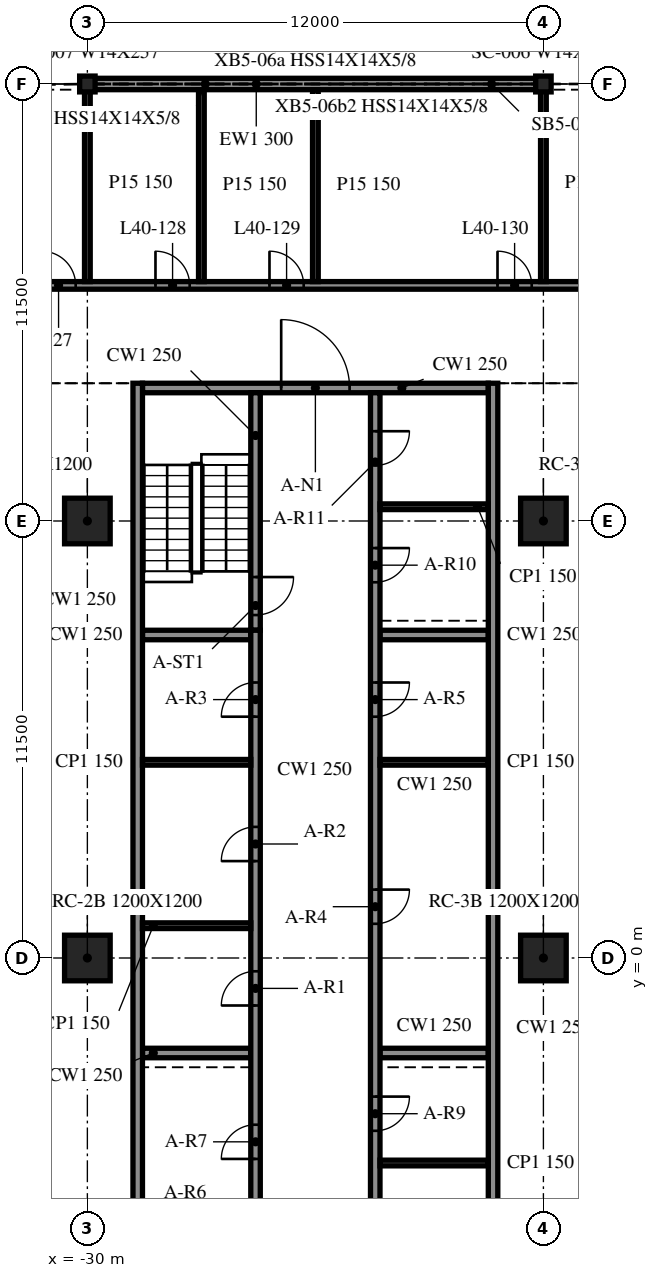
"""IFC4 building model, lengths in metres.
Left out: names, types, materials, properties, quantities, classifications, styles, units other than length and angle.
Written with IfcOpenShell. Run it as: python <this file> out.ifc"""

import sys

from ifc_helpers import new_model, si_unit, direction, frame, frame_2d, origin, origin_2d, place, context, subcontext, project, spatial, rectangle, i_section, extrude, element, fill, save


model = new_model("IFC4")
c1 = context("Model", 3, precision=1e-05, world=origin(), true_north=direction((0.0, 1.0)))
c2 = subcontext(c1, "Body", "Model", "MODEL_VIEW")
j1 = project(units=[si_unit("LENGTHUNIT", "METRE"), si_unit("PLANEANGLEUNIT", "RADIAN")], contexts=[c1])
p1 = place(None, origin())
s1 = spatial("IfcSite", under=j1, at=p1, CompositionType="ELEMENT")
p2 = place(p1, origin())
s2 = spatial("IfcBuilding", under=s1, at=p2, CompositionType="ELEMENT")
p3 = place(p2, frame((0.0, 0.0, 170.6)))
s3 = spatial("IfcBuildingStorey", under=s2, at=p3, CompositionType="ELEMENT", Elevation=170.6)
for number, where, z_axis, x_axis in (
    (1, (-30.0, 0.0, -0.34), (0.0, 0.0, 1.0), (1.0, 0.0, 0.0)),
    (2, (-30.0, 11.5, -0.34), (0.0, 0.0, 1.0), (1.0, 0.0, 0.0)),
    (3, (-18.0, 0.0, -0.34), (0.0, 0.0, 1.0), (1.0, 0.0, 0.0)),
    (4, (-18.0, 11.5, -0.34), (0.0, 0.0, 1.0), (1.0, 0.0, 0.0)),
):
    element("IfcColumn", number, at=place(p3, frame(where, z_axis=z_axis, x_axis=x_axis)), inside=s3, PredefinedType="COLUMN", context=c2, shape_type="SweptSolid", body=[
        extrude(rectangle(XDim=1.2, YDim=1.2, at=origin_2d()), origin(), (0.0, 0.0, 1.0), 3.8),
    ])
for number, where, z_axis, x_axis in (
    (5, (-18.0, 23.0, -0.34), (0.0, 0.0, 1.0), (1.0, 0.0, 0.0)),
    (6, (-30.0, 23.0, -0.34), (0.0, 0.0, 1.0), (1.0, 0.0, 0.0)),
):
    element("IfcColumn", number, at=place(p3, frame(where, z_axis=z_axis, x_axis=x_axis)), inside=s3, PredefinedType="COLUMN", context=c2, shape_type="SweptSolid", body=[
        extrude(i_section(OverallWidth=0.406, OverallDepth=0.417, WebThickness=0.03, FlangeThickness=0.048, at=origin_2d()), origin(), (0.0, 0.0, 1.0), 3.8),
    ])
p4 = place(p3, frame((-18.015, 23.0, 0.0), z_axis=(0.0, 0.0, 1.0), x_axis=(-1.0, 0.0, 0.0)))
e7 = element("IfcWall", 7, at=p4, inside=s3, PredefinedType="NOTDEFINED", context=c2, shape_type="SweptSolid", body=[
    extrude(rectangle(XDim=11.97, YDim=0.3, at=frame_2d((5.985, 0.0))), origin(), (0.0, 0.0, 1.0), 2.782),
])
for number, where, z_axis, x_axis in (
    (8, (-28.675, 15.125, 0.0), (0.0, 0.0, 1.0), (0.0, -1.0, 0.0)),
    (9, (-19.325, -9.125, 0.0), (0.0, 0.0, 1.0), (0.0, 1.0, 0.0)),
):
    element("IfcWall", number, at=place(p3, frame(where, z_axis=z_axis, x_axis=x_axis)), inside=s3, PredefinedType="SOLIDWALL", context=c2, shape_type="SweptSolid", body=[
        extrude(rectangle(XDim=24.25, YDim=0.25, at=frame_2d((12.125, 0.0))), origin(), (0.0, 0.0, 1.0), 3.46),
    ])
p5 = place(p3, frame((-28.55, 15.0, 0.0), z_axis=(0.0, 0.0, 1.0), x_axis=(1.0, 0.0, 0.0)))
e10 = element("IfcWall", 10, at=p5, inside=s3, PredefinedType="SOLIDWALL", context=c2, shape_type="SweptSolid", body=[
    extrude(rectangle(XDim=9.1, YDim=0.25, at=frame_2d((4.55, 0.0))), origin(), (0.0, 0.0, 1.0), 3.46),
])
p6 = place(p5, frame((3.65, 0.0, 0.0)))
e11 = element("IfcOpeningElement", 11, at=p6, cuts=e10, PredefinedType="OPENING", context=c2, shape_type="SweptSolid", body=[
    extrude(rectangle(XDim=1.8, YDim=2.1, at=frame_2d((0.9, 1.05))), frame((0.0, 0.135, 0.0), z_axis=(0.0, -1.0, 0.0), x_axis=(1.0, 0.0, 0.0)), (0.0, 0.0, 1.0), 0.27),
])
p7 = place(p3, frame((-25.575, -8.875, 0.0), z_axis=(0.0, 0.0, 1.0), x_axis=(0.0, 1.0, 0.0)))
e12 = element("IfcWall", 12, at=p7, inside=s3, PredefinedType="SOLIDWALL", context=c2, shape_type="SweptSolid", body=[
    extrude(rectangle(XDim=17.5, YDim=0.25, at=frame_2d((8.75, 0.0))), origin(), (0.0, 0.0, 1.0), 3.46),
])
p8 = place(p7, frame((7.625, 0.0, 0.0)))
e13 = element("IfcOpeningElement", 13, at=p8, cuts=e12, PredefinedType="OPENING", context=c2, shape_type="SweptSolid", body=[
    extrude(rectangle(XDim=0.9, YDim=2.1, at=frame_2d((0.45, 1.05))), frame((0.0, 0.135, 0.0), z_axis=(0.0, -1.0, 0.0), x_axis=(1.0, 0.0, 0.0)), (0.0, 0.0, 1.0), 0.27),
])
p9 = place(p7, frame((11.425, 0.0, 0.0)))
e14 = element("IfcOpeningElement", 14, at=p9, cuts=e12, PredefinedType="OPENING", context=c2, shape_type="SweptSolid", body=[
    extrude(rectangle(XDim=0.9, YDim=2.1, at=frame_2d((0.45, 1.05))), frame((0.0, 0.135, 0.0), z_axis=(0.0, -1.0, 0.0), x_axis=(1.0, 0.0, 0.0)), (0.0, 0.0, 1.0), 0.27),
])
p10 = place(p7, frame((15.225, 0.0, 0.0)))
e15 = element("IfcOpeningElement", 15, at=p10, cuts=e12, PredefinedType="OPENING", context=c2, shape_type="SweptSolid", body=[
    extrude(rectangle(XDim=0.9, YDim=2.1, at=frame_2d((0.45, 1.05))), frame((0.0, 0.135, 0.0), z_axis=(0.0, -1.0, 0.0), x_axis=(1.0, 0.0, 0.0)), (0.0, 0.0, 1.0), 0.27),
])
p11 = place(p7, frame((0.512, 0.0, 0.0)))
e16 = element("IfcOpeningElement", 16, at=p11, cuts=e12, PredefinedType="OPENING", context=c2, shape_type="SweptSolid", body=[
    extrude(rectangle(XDim=0.9, YDim=2.1, at=frame_2d((0.45, 1.05))), frame((0.0, 0.135, 0.0), z_axis=(0.0, -1.0, 0.0), x_axis=(1.0, 0.0, 0.0)), (0.0, 0.0, 1.0), 0.27),
])
p12 = place(p7, frame((3.587, 0.0, 0.0)))
e17 = element("IfcOpeningElement", 17, at=p12, cuts=e12, PredefinedType="OPENING", context=c2, shape_type="SweptSolid", body=[
    extrude(rectangle(XDim=0.9, YDim=2.1, at=frame_2d((0.45, 1.05))), frame((0.0, 0.135, 0.0), z_axis=(0.0, -1.0, 0.0), x_axis=(1.0, 0.0, 0.0)), (0.0, 0.0, 1.0), 0.27),
])
p13 = place(p3, frame((-25.575, 14.875, 0.0), z_axis=(0.0, 0.0, 1.0), x_axis=(0.0, -1.0, 0.0)))
e18 = element("IfcWall", 18, at=p13, inside=s3, PredefinedType="SOLIDWALL", context=c2, shape_type="SweptSolid", body=[
    extrude(rectangle(XDim=6.25, YDim=0.25, at=frame_2d((3.125, 0.0))), origin(), (0.0, 0.0, 1.0), 3.46),
])
p14 = place(p13, frame((4.85, 0.0, 0.0)))
e19 = element("IfcOpeningElement", 19, at=p14, cuts=e18, PredefinedType="OPENING", context=c2, shape_type="SweptSolid", body=[
    extrude(rectangle(XDim=1.0, YDim=2.1, at=frame_2d((0.5, 1.05))), frame((0.0, 0.135, 0.0), z_axis=(0.0, -1.0, 0.0), x_axis=(1.0, 0.0, 0.0)), (0.0, 0.0, 1.0), 0.27),
])
p15 = place(p3, frame((-22.425, 14.875, 0.0), z_axis=(0.0, 0.0, 1.0), x_axis=(0.0, -1.0, 0.0)))
e20 = element("IfcWall", 20, at=p15, inside=s3, PredefinedType="SOLIDWALL", context=c2, shape_type="SweptSolid", body=[
    extrude(rectangle(XDim=23.75, YDim=0.25, at=frame_2d((11.875, 0.0))), origin(), (0.0, 0.0, 1.0), 3.46),
])
p16 = place(p15, frame((13.075, 0.0, 0.0)))
e21 = element("IfcOpeningElement", 21, at=p16, cuts=e20, PredefinedType="OPENING", context=c2, shape_type="SweptSolid", body=[
    extrude(rectangle(XDim=0.9, YDim=2.1, at=frame_2d((0.45, 1.05))), frame((0.0, 0.135, 0.0), z_axis=(0.0, -1.0, 0.0), x_axis=(1.0, 0.0, 0.0)), (0.0, 0.0, 1.0), 0.27),
])
p17 = place(p15, frame((7.625, 0.0, 0.0)))
e22 = element("IfcOpeningElement", 22, at=p17, cuts=e20, PredefinedType="OPENING", context=c2, shape_type="SweptSolid", body=[
    extrude(rectangle(XDim=0.9, YDim=2.1, at=frame_2d((0.45, 1.05))), frame((0.0, 0.135, 0.0), z_axis=(0.0, -1.0, 0.0), x_axis=(1.0, 0.0, 0.0)), (0.0, 0.0, 1.0), 0.27),
])
p18 = place(p15, frame((21.597, 0.0, 0.0)))
e23 = element("IfcOpeningElement", 23, at=p18, cuts=e20, PredefinedType="OPENING", context=c2, shape_type="SweptSolid", body=[
    extrude(rectangle(XDim=0.9, YDim=2.1, at=frame_2d((0.45, 1.05))), frame((0.0, 0.135, 0.0), z_axis=(0.0, -1.0, 0.0), x_axis=(1.0, 0.0, 0.0)), (0.0, 0.0, 1.0), 0.27),
])
p19 = place(p15, frame((18.522, 0.0, 0.0)))
e24 = element("IfcOpeningElement", 24, at=p19, cuts=e20, PredefinedType="OPENING", context=c2, shape_type="SweptSolid", body=[
    extrude(rectangle(XDim=0.9, YDim=2.1, at=frame_2d((0.45, 1.05))), frame((0.0, 0.135, 0.0), z_axis=(0.0, -1.0, 0.0), x_axis=(1.0, 0.0, 0.0)), (0.0, 0.0, 1.0), 0.27),
])
p20 = place(p15, frame((4.087, 0.0, 0.0)))
e25 = element("IfcOpeningElement", 25, at=p20, cuts=e20, PredefinedType="OPENING", context=c2, shape_type="SweptSolid", body=[
    extrude(rectangle(XDim=0.9, YDim=2.1, at=frame_2d((0.45, 1.05))), frame((0.0, 0.135, 0.0), z_axis=(0.0, -1.0, 0.0), x_axis=(1.0, 0.0, 0.0)), (0.0, 0.0, 1.0), 0.27),
])
p21 = place(p15, frame((1.012, 0.0, 0.0)))
e26 = element("IfcOpeningElement", 26, at=p21, cuts=e20, PredefinedType="OPENING", context=c2, shape_type="SweptSolid", body=[
    extrude(rectangle(XDim=0.9, YDim=2.1, at=frame_2d((0.45, 1.05))), frame((0.0, 0.135, 0.0), z_axis=(0.0, -1.0, 0.0), x_axis=(1.0, 0.0, 0.0)), (0.0, 0.0, 1.0), 0.27),
])
for number, where, z_axis, x_axis in (
    (27, (-28.55, -2.5, 0.0), (0.0, 0.0, 1.0), (1.0, 0.0, 0.0)),
    (28, (-28.55, 8.5, 0.0), (0.0, 0.0, 1.0), (1.0, 0.0, 0.0)),
    (29, (-22.3, -2.5, 0.0), (0.0, 0.0, 1.0), (1.0, 0.0, 0.0)),
    (30, (-22.3, 8.5, 0.0), (0.0, 0.0, 1.0), (1.0, 0.0, 0.0)),
):
    element("IfcWall", number, at=place(p3, frame(where, z_axis=z_axis, x_axis=x_axis)), inside=s3, PredefinedType="SOLIDWALL", context=c2, shape_type="SweptSolid", body=[
        extrude(rectangle(XDim=2.85, YDim=0.25, at=frame_2d((1.425, 0.0))), origin(), (0.0, 0.0, 1.0), 3.46),
    ])
for number, where, z_axis, x_axis in (
    (31, (-28.55, 0.85, 0.0), (0.0, 0.0, 1.0), (1.0, 0.0, 0.0)),
    (32, (-28.55, 5.15, 0.0), (0.0, 0.0, 1.0), (1.0, 0.0, 0.0)),
    (33, (-22.3, 5.15, 0.0), (0.0, 0.0, 1.0), (1.0, 0.0, 0.0)),
    (34, (-22.3, -5.395, 0.0), (0.0, 0.0, 1.0), (1.0, 0.0, 0.0)),
    (35, (-22.3, 11.875, 0.0), (0.0, 0.0, 1.0), (1.0, 0.0, 0.0)),
):
    element("IfcWall", number, at=place(p3, frame(where, z_axis=z_axis, x_axis=x_axis)), inside=s3, PredefinedType="PARTITIONING", context=c2, shape_type="SweptSolid", body=[
        extrude(rectangle(XDim=2.85, YDim=0.15, at=frame_2d((1.425, 0.0))), origin(), (0.0, 0.0, 1.0), 3.46),
    ])
p22 = place(p3, frame((-47.708, 17.7, 0.0), z_axis=(0.0, 0.0, 1.0), x_axis=(1.0, 0.0, 0.0)))
e36 = element("IfcWall", 36, at=p22, inside=s3, PredefinedType="PARTITIONING", context=c2, shape_type="SweptSolid", body=[
    extrude(rectangle(XDim=95.416, YDim=0.2, at=frame_2d((47.708, 0.0))), origin(), (0.0, 0.0, 1.0), 3.46),
])
p23 = place(p22, frame((4.5, 0.0, 0.0)))
e37 = element("IfcOpeningElement", 37, at=p23, cuts=e36, PredefinedType="OPENING", context=c2, shape_type="SweptSolid", body=[
    extrude(rectangle(XDim=0.9, YDim=2.1, at=frame_2d((0.45, 1.05))), frame((0.0, 0.11, 0.0), z_axis=(0.0, -1.0, 0.0), x_axis=(1.0, 0.0, 0.0)), (0.0, 0.0, 1.0), 0.22),
])
p24 = place(p22, frame((16.5, 0.0, 0.0)))
e38 = element("IfcOpeningElement", 38, at=p24, cuts=e36, PredefinedType="OPENING", context=c2, shape_type="SweptSolid", body=[
    extrude(rectangle(XDim=0.9, YDim=2.1, at=frame_2d((0.45, 1.05))), frame((0.0, 0.11, 0.0), z_axis=(0.0, -1.0, 0.0), x_axis=(1.0, 0.0, 0.0)), (0.0, 0.0, 1.0), 0.22),
])
p25 = place(p22, frame((19.5, 0.0, 0.0)))
e39 = element("IfcOpeningElement", 39, at=p25, cuts=e36, PredefinedType="OPENING", context=c2, shape_type="SweptSolid", body=[
    extrude(rectangle(XDim=0.9, YDim=2.1, at=frame_2d((0.45, 1.05))), frame((0.0, 0.11, 0.0), z_axis=(0.0, -1.0, 0.0), x_axis=(1.0, 0.0, 0.0)), (0.0, 0.0, 1.0), 0.22),
])
p26 = place(p22, frame((22.5, 0.0, 0.0)))
e40 = element("IfcOpeningElement", 40, at=p26, cuts=e36, PredefinedType="OPENING", context=c2, shape_type="SweptSolid", body=[
    extrude(rectangle(XDim=0.9, YDim=2.1, at=frame_2d((0.45, 1.05))), frame((0.0, 0.11, 0.0), z_axis=(0.0, -1.0, 0.0), x_axis=(1.0, 0.0, 0.0)), (0.0, 0.0, 1.0), 0.22),
])
p27 = place(p22, frame((28.5, 0.0, 0.0)))
e41 = element("IfcOpeningElement", 41, at=p27, cuts=e36, PredefinedType="OPENING", context=c2, shape_type="SweptSolid", body=[
    extrude(rectangle(XDim=0.9, YDim=2.1, at=frame_2d((0.45, 1.05))), frame((0.0, 0.11, 0.0), z_axis=(0.0, -1.0, 0.0), x_axis=(1.0, 0.0, 0.0)), (0.0, 0.0, 1.0), 0.22),
])
p28 = place(p22, frame((40.5, 0.0, 0.0)))
e42 = element("IfcOpeningElement", 42, at=p28, cuts=e36, PredefinedType="OPENING", context=c2, shape_type="SweptSolid", body=[
    extrude(rectangle(XDim=0.9, YDim=2.1, at=frame_2d((0.45, 1.05))), frame((0.0, 0.11, 0.0), z_axis=(0.0, -1.0, 0.0), x_axis=(1.0, 0.0, 0.0)), (0.0, 0.0, 1.0), 0.22),
])
p29 = place(p22, frame((43.5, 0.0, 0.0)))
e43 = element("IfcOpeningElement", 43, at=p29, cuts=e36, PredefinedType="OPENING", context=c2, shape_type="SweptSolid", body=[
    extrude(rectangle(XDim=0.9, YDim=2.1, at=frame_2d((0.45, 1.05))), frame((0.0, 0.11, 0.0), z_axis=(0.0, -1.0, 0.0), x_axis=(1.0, 0.0, 0.0)), (0.0, 0.0, 1.0), 0.22),
])
p30 = place(p22, frame((46.5, 0.0, 0.0)))
e44 = element("IfcOpeningElement", 44, at=p30, cuts=e36, PredefinedType="OPENING", context=c2, shape_type="SweptSolid", body=[
    extrude(rectangle(XDim=0.9, YDim=2.1, at=frame_2d((0.45, 1.05))), frame((0.0, 0.11, 0.0), z_axis=(0.0, -1.0, 0.0), x_axis=(1.0, 0.0, 0.0)), (0.0, 0.0, 1.0), 0.22),
])
p31 = place(p22, frame((48.1, 0.0, 0.0)))
e45 = element("IfcOpeningElement", 45, at=p31, cuts=e36, PredefinedType="OPENING", context=c2, shape_type="SweptSolid", body=[
    extrude(rectangle(XDim=0.9, YDim=2.1, at=frame_2d((0.45, 1.05))), frame((0.0, 0.11, 0.0), z_axis=(0.0, -1.0, 0.0), x_axis=(1.0, 0.0, 0.0)), (0.0, 0.0, 1.0), 0.22),
])
p32 = place(p22, frame((54.1, 0.0, 0.0)))
e46 = element("IfcOpeningElement", 46, at=p32, cuts=e36, PredefinedType="OPENING", context=c2, shape_type="SweptSolid", body=[
    extrude(rectangle(XDim=0.9, YDim=2.1, at=frame_2d((0.45, 1.05))), frame((0.0, 0.11, 0.0), z_axis=(0.0, -1.0, 0.0), x_axis=(1.0, 0.0, 0.0)), (0.0, 0.0, 1.0), 0.22),
])
p33 = place(p22, frame((66.1, 0.0, 0.0)))
e47 = element("IfcOpeningElement", 47, at=p33, cuts=e36, PredefinedType="OPENING", context=c2, shape_type="SweptSolid", body=[
    extrude(rectangle(XDim=0.9, YDim=2.1, at=frame_2d((0.45, 1.05))), frame((0.0, 0.11, 0.0), z_axis=(0.0, -1.0, 0.0), x_axis=(1.0, 0.0, 0.0)), (0.0, 0.0, 1.0), 0.22),
])
p34 = place(p22, frame((69.1, 0.0, 0.0)))
e48 = element("IfcOpeningElement", 48, at=p34, cuts=e36, PredefinedType="OPENING", context=c2, shape_type="SweptSolid", body=[
    extrude(rectangle(XDim=0.9, YDim=2.1, at=frame_2d((0.45, 1.05))), frame((0.0, 0.11, 0.0), z_axis=(0.0, -1.0, 0.0), x_axis=(1.0, 0.0, 0.0)), (0.0, 0.0, 1.0), 0.22),
])
p35 = place(p22, frame((72.1, 0.0, 0.0)))
e49 = element("IfcOpeningElement", 49, at=p35, cuts=e36, PredefinedType="OPENING", context=c2, shape_type="SweptSolid", body=[
    extrude(rectangle(XDim=0.9, YDim=2.1, at=frame_2d((0.45, 1.05))), frame((0.0, 0.11, 0.0), z_axis=(0.0, -1.0, 0.0), x_axis=(1.0, 0.0, 0.0)), (0.0, 0.0, 1.0), 0.22),
])
p36 = place(p22, frame((78.1, 0.0, 0.0)))
e50 = element("IfcOpeningElement", 50, at=p36, cuts=e36, PredefinedType="OPENING", context=c2, shape_type="SweptSolid", body=[
    extrude(rectangle(XDim=0.9, YDim=2.1, at=frame_2d((0.45, 1.05))), frame((0.0, 0.11, 0.0), z_axis=(0.0, -1.0, 0.0), x_axis=(1.0, 0.0, 0.0)), (0.0, 0.0, 1.0), 0.22),
])
p37 = place(p22, frame((90.1, 0.0, 0.0)))
e51 = element("IfcOpeningElement", 51, at=p37, cuts=e36, PredefinedType="OPENING", context=c2, shape_type="SweptSolid", body=[
    extrude(rectangle(XDim=0.9, YDim=2.1, at=frame_2d((0.45, 1.05))), frame((0.0, 0.11, 0.0), z_axis=(0.0, -1.0, 0.0), x_axis=(1.0, 0.0, 0.0)), (0.0, 0.0, 1.0), 0.22),
])
p38 = place(p3, frame((-30.0, 17.8, 0.0), z_axis=(0.0, 0.0, 1.0), x_axis=(0.0, 1.0, 0.0)))
e52 = element("IfcWall", 52, at=p38, inside=s3, PredefinedType="PARTITIONING", context=c2, shape_type="SweptSolid", body=[
    extrude(rectangle(XDim=5.175, YDim=0.15, at=frame_2d((2.587, 0.0))), origin(), (0.0, 0.0, 1.0), 3.46),
])
for number, where, z_axis, x_axis in (
    (53, (-27.0, 17.8, 0.0), (0.0, 0.0, 1.0), (0.0, 1.0, 0.0)),
    (54, (-24.0, 17.8, 0.0), (0.0, 0.0, 1.0), (0.0, 1.0, 0.0)),
):
    element("IfcWall", number, at=place(p3, frame(where, z_axis=z_axis, x_axis=x_axis)), inside=s3, PredefinedType="PARTITIONING", context=c2, shape_type="SweptSolid", body=[
        extrude(rectangle(XDim=5.05, YDim=0.15, at=frame_2d((2.525, 0.0))), origin(), (0.0, 0.0, 1.0), 3.46),
    ])
p39 = place(p3, frame((-18.0, 17.8, 0.0), z_axis=(0.0, 0.0, 1.0), x_axis=(0.0, 1.0, 0.0)))
e55 = element("IfcWall", 55, at=p39, inside=s3, PredefinedType="PARTITIONING", context=c2, shape_type="SweptSolid", body=[
    extrude(rectangle(XDim=5.175, YDim=0.15, at=frame_2d((2.587, 0.0))), origin(), (0.0, 0.0, 1.0), 3.46),
])
p40 = place(p6, origin())
e56 = element("IfcDoor", 56, at=p40, inside=s3, OperationType="DOUBLE_DOOR_SINGLE_SWING", PredefinedType="DOOR", context=c2, shape_type="SweptSolid", body=[
    extrude(rectangle(XDim=1.8, YDim=2.1, at=frame_2d((0.9, 1.05))), frame((0.0, 0.025, 0.0), z_axis=(0.0, -1.0, 0.0), x_axis=(1.0, 0.0, 0.0)), (0.0, 0.0, 1.0), 0.05),
])
fill(e11, e56)
p41 = place(p8, origin())
e57 = element("IfcDoor", 57, at=p41, inside=s3, OperationType="SINGLE_SWING_LEFT", PredefinedType="DOOR", context=c2, shape_type="SweptSolid", body=[
    extrude(rectangle(XDim=0.9, YDim=2.1, at=frame_2d((0.45, 1.05))), frame((0.0, 0.025, 0.0), z_axis=(0.0, -1.0, 0.0), x_axis=(1.0, 0.0, 0.0)), (0.0, 0.0, 1.0), 0.05),
])
fill(e13, e57)
p42 = place(p9, origin())
e58 = element("IfcDoor", 58, at=p42, inside=s3, OperationType="SINGLE_SWING_RIGHT", PredefinedType="DOOR", context=c2, shape_type="SweptSolid", body=[
    extrude(rectangle(XDim=0.9, YDim=2.1, at=frame_2d((0.45, 1.05))), frame((0.0, 0.025, 0.0), z_axis=(0.0, -1.0, 0.0), x_axis=(1.0, 0.0, 0.0)), (0.0, 0.0, 1.0), 0.05),
])
fill(e14, e58)
p43 = place(p10, origin())
e59 = element("IfcDoor", 59, at=p43, inside=s3, OperationType="SINGLE_SWING_LEFT", PredefinedType="DOOR", context=c2, shape_type="SweptSolid", body=[
    extrude(rectangle(XDim=0.9, YDim=2.1, at=frame_2d((0.45, 1.05))), frame((0.0, 0.025, 0.0), z_axis=(0.0, -1.0, 0.0), x_axis=(1.0, 0.0, 0.0)), (0.0, 0.0, 1.0), 0.05),
])
fill(e15, e59)
p44 = place(p16, origin())
e60 = element("IfcDoor", 60, at=p44, inside=s3, OperationType="SINGLE_SWING_RIGHT", PredefinedType="DOOR", context=c2, shape_type="SweptSolid", body=[
    extrude(rectangle(XDim=0.9, YDim=2.1, at=frame_2d((0.45, 1.05))), frame((0.0, 0.025, 0.0), z_axis=(0.0, -1.0, 0.0), x_axis=(1.0, 0.0, 0.0)), (0.0, 0.0, 1.0), 0.05),
])
fill(e21, e60)
p45 = place(p17, origin())
e61 = element("IfcDoor", 61, at=p45, inside=s3, OperationType="SINGLE_SWING_LEFT", PredefinedType="DOOR", context=c2, shape_type="SweptSolid", body=[
    extrude(rectangle(XDim=0.9, YDim=2.1, at=frame_2d((0.45, 1.05))), frame((0.0, 0.025, 0.0), z_axis=(0.0, -1.0, 0.0), x_axis=(1.0, 0.0, 0.0)), (0.0, 0.0, 1.0), 0.05),
])
fill(e22, e61)
p46 = place(p12, origin())
e62 = element("IfcDoor", 62, at=p46, inside=s3, OperationType="SINGLE_SWING_LEFT", PredefinedType="DOOR", context=c2, shape_type="SweptSolid", body=[
    extrude(rectangle(XDim=0.9, YDim=2.1, at=frame_2d((0.45, 1.05))), frame((0.0, 0.025, 0.0), z_axis=(0.0, -1.0, 0.0), x_axis=(1.0, 0.0, 0.0)), (0.0, 0.0, 1.0), 0.05),
])
fill(e17, e62)
p47 = place(p19, origin())
e63 = element("IfcDoor", 63, at=p47, inside=s3, OperationType="SINGLE_SWING_LEFT", PredefinedType="DOOR", context=c2, shape_type="SweptSolid", body=[
    extrude(rectangle(XDim=0.9, YDim=2.1, at=frame_2d((0.45, 1.05))), frame((0.0, 0.025, 0.0), z_axis=(0.0, -1.0, 0.0), x_axis=(1.0, 0.0, 0.0)), (0.0, 0.0, 1.0), 0.05),
])
fill(e24, e63)
p48 = place(p20, origin())
e64 = element("IfcDoor", 64, at=p48, inside=s3, OperationType="SINGLE_SWING_RIGHT", PredefinedType="DOOR", context=c2, shape_type="SweptSolid", body=[
    extrude(rectangle(XDim=0.9, YDim=2.1, at=frame_2d((0.45, 1.05))), frame((0.0, 0.025, 0.0), z_axis=(0.0, -1.0, 0.0), x_axis=(1.0, 0.0, 0.0)), (0.0, 0.0, 1.0), 0.05),
])
fill(e25, e64)
p49 = place(p21, origin())
e65 = element("IfcDoor", 65, at=p49, inside=s3, OperationType="SINGLE_SWING_LEFT", PredefinedType="DOOR", context=c2, shape_type="SweptSolid", body=[
    extrude(rectangle(XDim=0.9, YDim=2.1, at=frame_2d((0.45, 1.05))), frame((0.0, 0.025, 0.0), z_axis=(0.0, -1.0, 0.0), x_axis=(1.0, 0.0, 0.0)), (0.0, 0.0, 1.0), 0.05),
])
fill(e26, e65)
p50 = place(p14, origin())
e66 = element("IfcDoor", 66, at=p50, inside=s3, OperationType="SINGLE_SWING_RIGHT", PredefinedType="DOOR", context=c2, shape_type="SweptSolid", body=[
    extrude(rectangle(XDim=1.0, YDim=2.1, at=frame_2d((0.5, 1.05))), frame((0.0, 0.025, 0.0), z_axis=(0.0, -1.0, 0.0), x_axis=(1.0, 0.0, 0.0)), (0.0, 0.0, 1.0), 0.05),
])
fill(e19, e66)
p51 = place(p24, origin())
e67 = element("IfcDoor", 67, at=p51, inside=s3, OperationType="SINGLE_SWING_LEFT", PredefinedType="DOOR", context=c2, shape_type="SweptSolid", body=[
    extrude(rectangle(XDim=0.9, YDim=2.1, at=frame_2d((0.45, 1.05))), frame((0.0, 0.025, 0.0), z_axis=(0.0, -1.0, 0.0), x_axis=(1.0, 0.0, 0.0)), (0.0, 0.0, 1.0), 0.05),
])
fill(e38, e67)
p52 = place(p25, origin())
e68 = element("IfcDoor", 68, at=p52, inside=s3, OperationType="SINGLE_SWING_LEFT", PredefinedType="DOOR", context=c2, shape_type="SweptSolid", body=[
    extrude(rectangle(XDim=0.9, YDim=2.1, at=frame_2d((0.45, 1.05))), frame((0.0, 0.025, 0.0), z_axis=(0.0, -1.0, 0.0), x_axis=(1.0, 0.0, 0.0)), (0.0, 0.0, 1.0), 0.05),
])
fill(e39, e68)
p53 = place(p26, origin())
e69 = element("IfcDoor", 69, at=p53, inside=s3, OperationType="SINGLE_SWING_LEFT", PredefinedType="DOOR", context=c2, shape_type="SweptSolid", body=[
    extrude(rectangle(XDim=0.9, YDim=2.1, at=frame_2d((0.45, 1.05))), frame((0.0, 0.025, 0.0), z_axis=(0.0, -1.0, 0.0), x_axis=(1.0, 0.0, 0.0)), (0.0, 0.0, 1.0), 0.05),
])
fill(e40, e69)
p54 = place(p27, origin())
e70 = element("IfcDoor", 70, at=p54, inside=s3, OperationType="SINGLE_SWING_LEFT", PredefinedType="DOOR", context=c2, shape_type="SweptSolid", body=[
    extrude(rectangle(XDim=0.9, YDim=2.1, at=frame_2d((0.45, 1.05))), frame((0.0, 0.025, 0.0), z_axis=(0.0, -1.0, 0.0), x_axis=(1.0, 0.0, 0.0)), (0.0, 0.0, 1.0), 0.05),
])
fill(e41, e70)
save(model, sys.argv[1])
